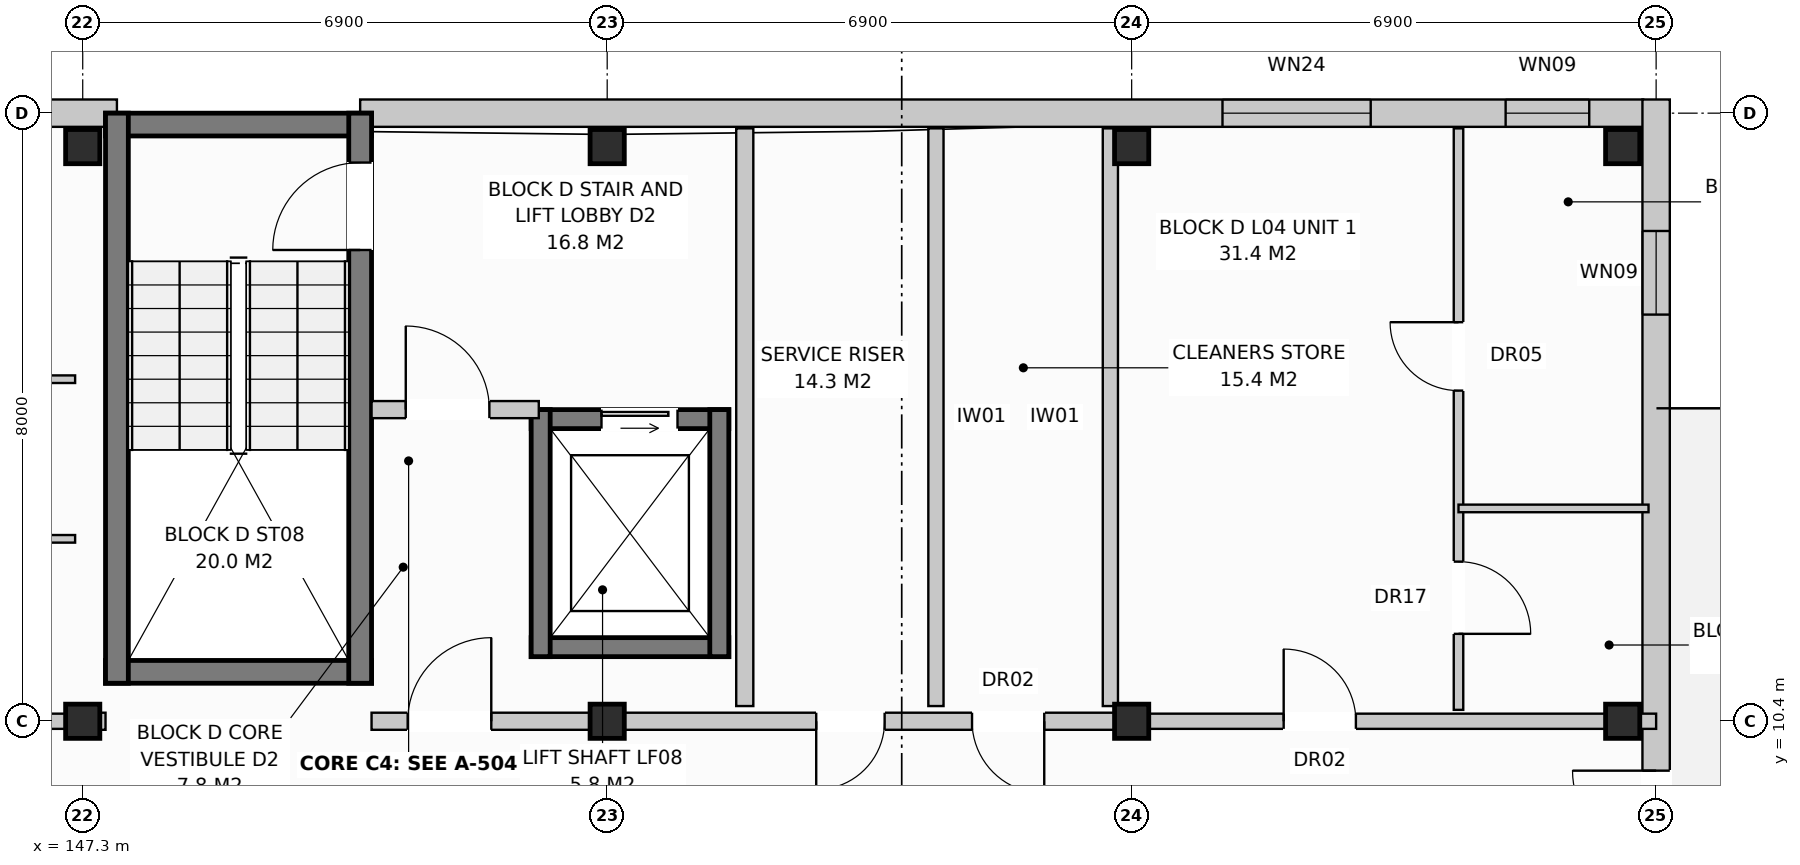
"""IFC4 building model, lengths in metres.
Left out: names, types, materials, properties, quantities, classifications, styles, units other than length and angle.
Written with IfcOpenShell. Run it as: python <this file> out.ifc"""

import sys

from ifc_helpers import new_model, si_unit, direction, frame, frame_2d, origin, origin_with_axes, origin_2d, place, context, subcontext, project, spatial, rectangle, extrude, element, fill, save


model = new_model("IFC4")
c1 = context("Model", 3, precision=1e-05, world=origin(), true_north=direction((0.0, 1.0)))
c2 = subcontext(c1, "Body", "Model", "MODEL_VIEW")
j1 = project(units=[si_unit("LENGTHUNIT", "METRE"), si_unit("PLANEANGLEUNIT", "RADIAN")], contexts=[c1])
p1 = place(None, origin())
s1 = spatial("IfcSite", under=j1, at=p1, CompositionType="ELEMENT")
p2 = place(p1, origin())
s2 = spatial("IfcBuilding", under=s1, at=p2, CompositionType="ELEMENT")
p3 = place(p2, frame((0.0, 0.0, 14.4)))
s3 = spatial("IfcBuildingStorey", under=s2, at=p3, CompositionType="ELEMENT", Elevation=14.4)
for number, where, z_axis, x_axis in (
    (1, (147.3, 10.4, 0.0), (0.0, 0.0, 1.0), (1.0, 0.0, 0.0)),
    (2, (147.3, 17.96, 0.0), (0.0, 0.0, 1.0), (1.0, 0.0, 0.0)),
    (3, (154.2, 10.4, 0.0), (0.0, 0.0, 1.0), (1.0, 0.0, 0.0)),
    (4, (154.2, 17.96, 0.0), (0.0, 0.0, 1.0), (1.0, 0.0, 0.0)),
    (5, (161.1, 10.4, 0.0), (0.0, 0.0, 1.0), (1.0, 0.0, 0.0)),
    (6, (161.1, 17.96, 0.0), (0.0, 0.0, 1.0), (1.0, 0.0, 0.0)),
    (7, (167.56, 10.4, 0.0), (0.0, 0.0, 1.0), (1.0, 0.0, 0.0)),
    (8, (167.56, 17.96, 0.0), (0.0, 0.0, 1.0), (1.0, 0.0, 0.0)),
):
    element("IfcColumn", number, at=place(p3, frame(where, z_axis=z_axis, x_axis=x_axis)), inside=s3, PredefinedType="COLUMN", context=c2, shape_type="SweptSolid", body=[
        extrude(rectangle(XDim=0.45, YDim=0.45, at=origin_2d()), origin(), (0.0, 0.0, 1.0), 3.2),
    ])
p4 = place(p3, frame((130.25, 18.4, 0.0), z_axis=(0.0, 0.0, 1.0), x_axis=(1.0, 0.0, 0.0)))
e9 = element("IfcWall", 9, at=p4, inside=s3, PredefinedType="STANDARD", context=c2, shape_type="SweptSolid", body=[
    extrude(rectangle(XDim=17.5, YDim=0.36, at=frame_2d((8.75, 0.0))), origin(), (0.0, 0.0, 1.0), 2.94),
])
p5 = place(p4, frame((11.97, 0.0, 0.0)))
e10 = element("IfcOpeningElement", 10, at=p5, cuts=e9, PredefinedType="OPENING", context=c2, shape_type="SweptSolid", body=[
    extrude(rectangle(XDim=0.95, YDim=2.1, at=frame_2d((0.475, 1.05))), frame((0.0, 0.192, 0.0), z_axis=(0.0, -1.0, 0.0), x_axis=(1.0, 0.0, 0.0)), (0.0, 0.0, 1.0), 0.384),
])
p6 = place(p4, frame((14.97, 0.0, 0.72)))
e11 = element("IfcOpeningElement", 11, at=p6, cuts=e9, PredefinedType="OPENING", context=c2, shape_type="SweptSolid", body=[
    extrude(rectangle(XDim=1.1, YDim=1.5, at=frame_2d((0.55, 0.75))), frame((0.0, 0.192, 0.0), z_axis=(0.0, -1.0, 0.0), x_axis=(1.0, 0.0, 0.0)), (0.0, 0.0, 1.0), 0.384),
])
p7 = place(p3, frame((150.95, 18.4, 0.0), z_axis=(0.0, 0.0, 1.0), x_axis=(1.0, 0.0, 0.0)))
e12 = element("IfcWall", 12, at=p7, inside=s3, PredefinedType="STANDARD", context=c2, shape_type="SweptSolid", body=[
    extrude(rectangle(XDim=16.88, YDim=0.36, at=frame_2d((8.44, 0.0))), origin(), (0.0, 0.0, 1.0), 2.94),
])
p8 = place(p7, frame((11.345, 0.0, 0.8)))
e13 = element("IfcOpeningElement", 13, at=p8, cuts=e12, PredefinedType="OPENING", context=c2, shape_type="SweptSolid", body=[
    extrude(rectangle(XDim=1.95, YDim=1.65, at=frame_2d((0.975, 0.825))), frame((0.0, 0.192, 0.0), z_axis=(0.0, -1.0, 0.0), x_axis=(1.0, 0.0, 0.0)), (0.0, 0.0, 1.0), 0.384),
])
p9 = place(p7, frame((15.07, 0.0, 0.72)))
e14 = element("IfcOpeningElement", 14, at=p9, cuts=e12, PredefinedType="OPENING", context=c2, shape_type="SweptSolid", body=[
    extrude(rectangle(XDim=1.1, YDim=1.5, at=frame_2d((0.55, 0.75))), frame((0.0, 0.192, 0.0), z_axis=(0.0, -1.0, 0.0), x_axis=(1.0, 0.0, 0.0)), (0.0, 0.0, 1.0), 0.384),
])
p10 = place(p3, frame((168.0, -0.18, 0.0), z_axis=(0.0, 0.0, 1.0), x_axis=(0.0, 1.0, 0.0)))
e15 = element("IfcWall", 15, at=p10, inside=s3, PredefinedType="STANDARD", context=c2, shape_type="SweptSolid", body=[
    extrude(rectangle(XDim=18.76, YDim=0.36, at=frame_2d((9.38, 0.0))), origin(), (0.0, 0.0, 1.0), 2.94),
])
p11 = place(p10, frame((8.83, 0.0, 0.0)))
e16 = element("IfcOpeningElement", 16, at=p11, cuts=e15, PredefinedType="OPENING", context=c2, shape_type="SweptSolid", body=[
    extrude(rectangle(XDim=1.1, YDim=2.1, at=frame_2d((0.55, 1.05))), frame((0.0, 0.192, 0.0), z_axis=(0.0, -1.0, 0.0), x_axis=(1.0, 0.0, 0.0)), (0.0, 0.0, 1.0), 0.384),
])
p12 = place(p10, frame((1.73, 0.0, 0.72)))
e17 = element("IfcOpeningElement", 17, at=p12, cuts=e15, PredefinedType="OPENING", context=c2, shape_type="SweptSolid", body=[
    extrude(rectangle(XDim=1.1, YDim=1.5, at=frame_2d((0.55, 0.75))), frame((0.0, 0.192, 0.0), z_axis=(0.0, -1.0, 0.0), x_axis=(1.0, 0.0, 0.0)), (0.0, 0.0, 1.0), 0.384),
])
p13 = place(p10, frame((15.93, 0.0, 0.72)))
e18 = element("IfcOpeningElement", 18, at=p13, cuts=e15, PredefinedType="OPENING", context=c2, shape_type="SweptSolid", body=[
    extrude(rectangle(XDim=1.1, YDim=1.5, at=frame_2d((0.55, 0.75))), frame((0.0, 0.192, 0.0), z_axis=(0.0, -1.0, 0.0), x_axis=(1.0, 0.0, 0.0)), (0.0, 0.0, 1.0), 0.384),
])
for number, where, z_axis, x_axis in (
    (19, (147.6, 18.25, 0.0), (0.0, 0.0, 1.0), (1.0, 0.0, 0.0)),
    (20, (147.6, 11.05, 0.0), (0.0, 0.0, 1.0), (1.0, 0.0, 0.0)),
):
    element("IfcWall", number, at=place(p3, frame(where, z_axis=z_axis, x_axis=x_axis)), inside=s3, PredefinedType="SHEAR", context=c2, shape_type="SweptSolid", body=[
        extrude(rectangle(XDim=3.5, YDim=0.3, at=frame_2d((1.75, 0.0))), origin(), (0.0, 0.0, 1.0), 2.94),
    ])
p14 = place(p3, frame((147.75, 10.9, 0.0), z_axis=(0.0, 0.0, 1.0), x_axis=(0.0, 1.0, 0.0)))
e21 = element("IfcWall", 21, at=p14, inside=s3, PredefinedType="SHEAR", context=c2, shape_type="SweptSolid", body=[
    extrude(rectangle(XDim=7.5, YDim=0.3, at=frame_2d((3.75, 0.0))), origin(), (0.0, 0.0, 1.0), 2.94),
])
p15 = place(p3, frame((150.95, 10.9, 0.0), z_axis=(0.0, 0.0, 1.0), x_axis=(0.0, 1.0, 0.0)))
e22 = element("IfcWall", 22, at=p15, inside=s3, PredefinedType="SHEAR", context=c2, shape_type="SweptSolid", body=[
    extrude(rectangle(XDim=7.5, YDim=0.3, at=frame_2d((3.75, 0.0))), origin(), (0.0, 0.0, 1.0), 2.94),
])
p16 = place(p15, frame((5.7, 0.0, 0.0)))
e23 = element("IfcOpeningElement", 23, at=p16, cuts=e22, PredefinedType="OPENING", context=c2, shape_type="SweptSolid", body=[
    extrude(rectangle(XDim=1.15, YDim=2.15, at=frame_2d((0.575, 1.075))), frame((0.0, 0.162, 0.0), z_axis=(0.0, -1.0, 0.0), x_axis=(1.0, 0.0, 0.0)), (0.0, 0.0, 1.0), 0.324),
])
p17 = place(p3, frame((153.2, 14.375, 0.0), z_axis=(0.0, 0.0, 1.0), x_axis=(1.0, 0.0, 0.0)))
e24 = element("IfcWall", 24, at=p17, inside=s3, PredefinedType="SHEAR", context=c2, shape_type="SweptSolid", body=[
    extrude(rectangle(XDim=2.6, YDim=0.25, at=frame_2d((1.3, 0.0))), origin(), (0.0, 0.0, 1.0), 2.94),
])
p18 = place(p17, frame((0.925, 0.0, 0.0)))
e25 = element("IfcOpeningElement", 25, at=p18, cuts=e24, PredefinedType="OPENING", context=c2, shape_type="SweptSolid", body=[
    extrude(rectangle(XDim=1.0, YDim=2.1, at=frame_2d((0.5, 1.05))), frame((0.0, 0.137, 0.0), z_axis=(0.0, -1.0, 0.0), x_axis=(1.0, 0.0, 0.0)), (0.0, 0.0, 1.0), 0.274),
])
p19 = place(p3, frame((153.2, 11.375, 0.0), z_axis=(0.0, 0.0, 1.0), x_axis=(1.0, 0.0, 0.0)))
e26 = element("IfcWall", 26, at=p19, inside=s3, PredefinedType="SHEAR", context=c2, shape_type="SweptSolid", body=[
    extrude(rectangle(XDim=2.6, YDim=0.25, at=frame_2d((1.3, 0.0))), origin(), (0.0, 0.0, 1.0), 2.94),
])
for number, where, z_axis, x_axis in (
    (27, (153.325, 11.25, 0.0), (0.0, 0.0, 1.0), (0.0, 1.0, 0.0)),
    (28, (155.675, 11.25, 0.0), (0.0, 0.0, 1.0), (0.0, 1.0, 0.0)),
):
    element("IfcWall", number, at=place(p3, frame(where, z_axis=z_axis, x_axis=x_axis)), inside=s3, PredefinedType="SHEAR", context=c2, shape_type="SweptSolid", body=[
        extrude(rectangle(XDim=3.25, YDim=0.25, at=frame_2d((1.625, 0.0))), origin(), (0.0, 0.0, 1.0), 2.94),
    ])
p20 = place(p3, frame((156.01, 10.6, 0.0), z_axis=(0.0, 0.0, 1.0), x_axis=(0.0, 1.0, 0.0)))
e29 = element("IfcWall", 29, at=p20, inside=s3, PredefinedType="PARTITIONING", context=c2, shape_type="SweptSolid", body=[
    extrude(rectangle(XDim=7.6, YDim=0.225, at=frame_2d((3.8, 0.0))), origin(), (0.0, 0.0, 1.0), 2.59),
])
p21 = place(p3, frame((151.1, 14.5, 0.0), z_axis=(0.0, 0.0, 1.0), x_axis=(1.0, 0.0, 0.0)))
e30 = element("IfcWall", 30, at=p21, inside=s3, PredefinedType="PARTITIONING", context=c2, shape_type="SweptSolid", body=[
    extrude(rectangle(XDim=2.2, YDim=0.225, at=frame_2d((1.1, 0.0))), origin(), (0.0, 0.0, 1.0), 2.94),
])
p22 = place(p21, frame((0.45, 0.0, 0.0)))
e31 = element("IfcOpeningElement", 31, at=p22, cuts=e30, PredefinedType="OPENING", context=c2, shape_type="SweptSolid", body=[
    extrude(rectangle(XDim=1.1, YDim=2.15, at=frame_2d((0.55, 1.075))), frame((0.0, 0.125, 0.0), z_axis=(0.0, -1.0, 0.0), x_axis=(1.0, 0.0, 0.0)), (0.0, 0.0, 1.0), 0.249),
])
p23 = place(p3, frame((147.3, 10.4, 0.0), z_axis=(0.0, 0.0, 1.0), x_axis=(1.0, 0.0, 0.0)))
e32 = element("IfcWall", 32, at=p23, inside=s3, PredefinedType="PARTITIONING", context=c2, shape_type="SweptSolid", body=[
    extrude(rectangle(XDim=0.3, YDim=0.225, at=frame_2d((0.15, 0.0))), origin(), (0.0, 0.0, 1.0), 2.94),
])
p24 = place(p3, frame((158.525, 10.6, 0.0), z_axis=(0.0, 0.0, 1.0), x_axis=(0.0, 1.0, 0.0)))
e33 = element("IfcWall", 33, at=p24, inside=s3, PredefinedType="PARTITIONING", context=c2, shape_type="SweptSolid", body=[
    extrude(rectangle(XDim=7.6, YDim=0.2, at=frame_2d((3.8, 0.0))), origin(), (0.0, 0.0, 1.0), 2.94),
])
p25 = place(p3, frame((160.82, 10.6, 0.0), z_axis=(0.0, 0.0, 1.0), x_axis=(0.0, 1.0, 0.0)))
e34 = element("IfcWall", 34, at=p25, inside=s3, PredefinedType="PARTITIONING", context=c2, shape_type="SweptSolid", body=[
    extrude(rectangle(XDim=7.6, YDim=0.2, at=frame_2d((3.8, 0.0))), origin(), (0.0, 0.0, 1.0), 2.38),
])
p26 = place(p3, frame((151.1, 10.4, 0.0), z_axis=(0.0, 0.0, 1.0), x_axis=(1.0, 0.0, 0.0)))
e35 = element("IfcWall", 35, at=p26, inside=s3, PredefinedType="PARTITIONING", context=c2, shape_type="SweptSolid", body=[
    extrude(rectangle(XDim=10.0, YDim=0.225, at=frame_2d((5.0, 0.0))), origin(), (0.0, 0.0, 1.0), 2.38),
])
p27 = place(p26, frame((0.475, 0.0, 0.0)))
e36 = element("IfcOpeningElement", 36, at=p27, cuts=e35, PredefinedType="OPENING", context=c2, shape_type="SweptSolid", body=[
    extrude(rectangle(XDim=1.1, YDim=2.15, at=frame_2d((0.55, 1.075))), frame((0.0, 0.125, 0.0), z_axis=(0.0, -1.0, 0.0), x_axis=(1.0, 0.0, 0.0)), (0.0, 0.0, 1.0), 0.249),
])
p28 = place(p26, frame((5.85, 0.0, 0.0)))
e37 = element("IfcOpeningElement", 37, at=p28, cuts=e35, PredefinedType="OPENING", context=c2, shape_type="SweptSolid", body=[
    extrude(rectangle(XDim=0.9, YDim=2.1, at=frame_2d((0.45, 1.05))), frame((0.0, 0.125, 0.0), z_axis=(0.0, -1.0, 0.0), x_axis=(1.0, 0.0, 0.0)), (0.0, 0.0, 1.0), 0.249),
])
p29 = place(p26, frame((7.9, 0.0, 0.0)))
e38 = element("IfcOpeningElement", 38, at=p29, cuts=e35, PredefinedType="OPENING", context=c2, shape_type="SweptSolid", body=[
    extrude(rectangle(XDim=0.95, YDim=2.15, at=frame_2d((0.475, 1.075))), frame((0.0, 0.125, 0.0), z_axis=(0.0, -1.0, 0.0), x_axis=(1.0, 0.0, 0.0)), (0.0, 0.0, 1.0), 0.249),
])
p30 = place(p3, frame((140.4, 10.4, 0.0), z_axis=(0.0, 0.0, 1.0), x_axis=(1.0, 0.0, 0.0)))
e39 = element("IfcWall", 39, at=p30, inside=s3, PredefinedType="PARTITIONING", context=c2, shape_type="SweptSolid", body=[
    extrude(rectangle(XDim=6.9, YDim=0.2, at=frame_2d((3.45, 0.0))), origin(), (0.0, 0.0, 1.0), 2.38),
])
p31 = place(p30, frame((2.0, 0.0, 0.0)))
e40 = element("IfcOpeningElement", 40, at=p31, cuts=e39, PredefinedType="OPENING", context=c2, shape_type="SweptSolid", body=[
    extrude(rectangle(XDim=0.95, YDim=2.15, at=frame_2d((0.475, 1.075))), frame((0.0, 0.112, 0.0), z_axis=(0.0, -1.0, 0.0), x_axis=(1.0, 0.0, 0.0)), (0.0, 0.0, 1.0), 0.224),
])
for number, where, z_axis, x_axis in (
    (41, (144.3, 12.8, 0.0), (0.0, 0.0, 1.0), (1.0, 0.0, 0.0)),
    (42, (144.3, 14.9, 0.0), (0.0, 0.0, 1.0), (1.0, 0.0, 0.0)),
):
    element("IfcWall", number, at=place(p3, frame(where, z_axis=z_axis, x_axis=x_axis)), inside=s3, PredefinedType="PARTITIONING", context=c2, shape_type="SweptSolid", body=[
        extrude(rectangle(XDim=2.9, YDim=0.1, at=frame_2d((1.45, 0.0))), origin(), (0.0, 0.0, 1.0), 2.94),
    ])
p32 = place(p3, frame((161.1, 10.4, 0.0), z_axis=(0.0, 0.0, 1.0), x_axis=(1.0, 0.0, 0.0)))
e43 = element("IfcWall", 43, at=p32, inside=s3, PredefinedType="PARTITIONING", context=c2, shape_type="SweptSolid", body=[
    extrude(rectangle(XDim=6.9, YDim=0.2, at=frame_2d((3.45, 0.0))), origin(), (0.0, 0.0, 1.0), 2.38),
])
p33 = place(p32, frame((2.0, 0.0, 0.0)))
e44 = element("IfcOpeningElement", 44, at=p33, cuts=e43, PredefinedType="OPENING", context=c2, shape_type="SweptSolid", body=[
    extrude(rectangle(XDim=0.95, YDim=2.15, at=frame_2d((0.475, 1.075))), frame((0.0, 0.112, 0.0), z_axis=(0.0, -1.0, 0.0), x_axis=(1.0, 0.0, 0.0)), (0.0, 0.0, 1.0), 0.224),
])
p34 = place(p3, frame((165.4, 10.55, 0.0), z_axis=(0.0, 0.0, 1.0), x_axis=(0.0, 1.0, 0.0)))
e45 = element("IfcWall", 45, at=p34, inside=s3, PredefinedType="PARTITIONING", context=c2, shape_type="SweptSolid", body=[
    extrude(rectangle(XDim=7.65, YDim=0.125, at=frame_2d((3.825, 0.0))), origin(), (0.0, 0.0, 1.0), 2.94),
])
p35 = place(p34, frame((1.0, 0.0, 0.0)))
e46 = element("IfcOpeningElement", 46, at=p35, cuts=e45, PredefinedType="OPENING", context=c2, shape_type="SweptSolid", body=[
    extrude(rectangle(XDim=0.95, YDim=2.1, at=frame_2d((0.475, 1.05))), frame((0.0, 0.074, 0.0), z_axis=(0.0, -1.0, 0.0), x_axis=(1.0, 0.0, 0.0)), (0.0, 0.0, 1.0), 0.149),
])
p36 = place(p34, frame((4.2, 0.0, 0.0)))
e47 = element("IfcOpeningElement", 47, at=p36, cuts=e45, PredefinedType="OPENING", context=c2, shape_type="SweptSolid", body=[
    extrude(rectangle(XDim=0.9, YDim=2.1, at=frame_2d((0.45, 1.05))), frame((0.0, 0.074, 0.0), z_axis=(0.0, -1.0, 0.0), x_axis=(1.0, 0.0, 0.0)), (0.0, 0.0, 1.0), 0.149),
])
p37 = place(p3, frame((165.4, 13.2, 0.0), z_axis=(0.0, 0.0, 1.0), x_axis=(1.0, 0.0, 0.0)))
e48 = element("IfcWall", 48, at=p37, inside=s3, PredefinedType="PARTITIONING", context=c2, shape_type="SweptSolid", body=[
    extrude(rectangle(XDim=2.5, YDim=0.1, at=frame_2d((1.25, 0.0))), origin(), (0.0, 0.0, 1.0), 2.94),
])
p38 = place(p8, origin_with_axes())
e49 = element("IfcWindow", 49, at=p38, inside=s3, PartitioningType="SINGLE_PANEL", PredefinedType="WINDOW", context=c2, shape_type="SweptSolid", body=[
    extrude(rectangle(XDim=1.95, YDim=1.65, at=frame_2d((0.975, 0.825))), frame((0.0, 0.03, 0.0), z_axis=(0.0, -1.0, 0.0), x_axis=(1.0, 0.0, 0.0)), (0.0, 0.0, 1.0), 0.06),
])
fill(e13, e49)
p39 = place(p9, origin_with_axes())
e50 = element("IfcWindow", 50, at=p39, inside=s3, PartitioningType="SINGLE_PANEL", PredefinedType="WINDOW", context=c2, shape_type="SweptSolid", body=[
    extrude(rectangle(XDim=1.1, YDim=1.5, at=frame_2d((0.55, 0.75))), frame((0.0, 0.03, 0.0), z_axis=(0.0, -1.0, 0.0), x_axis=(1.0, 0.0, 0.0)), (0.0, 0.0, 1.0), 0.06),
])
fill(e14, e50)
p40 = place(p11, origin_with_axes())
e51 = element("IfcDoor", 51, at=p40, inside=s3, OperationType="SINGLE_SWING_RIGHT", PredefinedType="DOOR", context=c2, shape_type="SweptSolid", body=[
    extrude(rectangle(XDim=1.1, YDim=2.1, at=frame_2d((0.55, 1.05))), frame((0.0, 0.025, 0.0), z_axis=(0.0, -1.0, 0.0), x_axis=(1.0, 0.0, 0.0)), (0.0, 0.0, 1.0), 0.05),
])
fill(e16, e51)
p41 = place(p13, origin_with_axes())
e52 = element("IfcWindow", 52, at=p41, inside=s3, PartitioningType="SINGLE_PANEL", PredefinedType="WINDOW", context=c2, shape_type="SweptSolid", body=[
    extrude(rectangle(XDim=1.1, YDim=1.5, at=frame_2d((0.55, 0.75))), frame((0.0, 0.03, 0.0), z_axis=(0.0, -1.0, 0.0), x_axis=(1.0, 0.0, 0.0)), (0.0, 0.0, 1.0), 0.06),
])
fill(e18, e52)
p42 = place(p16, origin_with_axes())
e53 = element("IfcDoor", 53, at=p42, inside=s3, OperationType="SINGLE_SWING_LEFT", PredefinedType="DOOR", context=c2, shape_type="SweptSolid", body=[
    extrude(rectangle(XDim=1.15, YDim=2.15, at=frame_2d((0.575, 1.075))), frame((0.0, 0.025, 0.0), z_axis=(0.0, -1.0, 0.0), x_axis=(1.0, 0.0, 0.0)), (0.0, 0.0, 1.0), 0.05),
])
fill(e23, e53)
p43 = place(p18, origin_with_axes())
e54 = element("IfcDoor", 54, at=p43, inside=s3, OperationType="SLIDING_TO_LEFT", PredefinedType="DOOR", context=c2, shape_type="SweptSolid", body=[
    extrude(rectangle(XDim=1.0, YDim=2.1, at=frame_2d((0.5, 1.05))), frame((0.0, 0.025, 0.0), z_axis=(0.0, -1.0, 0.0), x_axis=(1.0, 0.0, 0.0)), (0.0, 0.0, 1.0), 0.05),
])
fill(e25, e54)
p44 = place(p22, origin_with_axes())
e55 = element("IfcDoor", 55, at=p44, inside=s3, OperationType="SINGLE_SWING_LEFT", PredefinedType="DOOR", context=c2, shape_type="SweptSolid", body=[
    extrude(rectangle(XDim=1.1, YDim=2.15, at=frame_2d((0.55, 1.075))), frame((0.0, 0.025, 0.0), z_axis=(0.0, -1.0, 0.0), x_axis=(1.0, 0.0, 0.0)), (0.0, 0.0, 1.0), 0.05),
])
fill(e31, e55)
p45 = place(p27, origin_with_axes())
e56 = element("IfcDoor", 56, at=p45, inside=s3, OperationType="SINGLE_SWING_RIGHT", PredefinedType="DOOR", context=c2, shape_type="SweptSolid", body=[
    extrude(rectangle(XDim=1.1, YDim=2.15, at=frame_2d((0.55, 1.075))), frame((0.0, 0.025, 0.0), z_axis=(0.0, -1.0, 0.0), x_axis=(1.0, 0.0, 0.0)), (0.0, 0.0, 1.0), 0.05),
])
fill(e36, e56)
p46 = place(p28, frame((0.9, 0.0, 0.0), z_axis=(0.0, 0.0, 1.0), x_axis=(-1.0, 0.0, 0.0)))
e57 = element("IfcDoor", 57, at=p46, inside=s3, OperationType="SINGLE_SWING_LEFT", PredefinedType="DOOR", context=c2, shape_type="SweptSolid", body=[
    extrude(rectangle(XDim=0.9, YDim=2.1, at=frame_2d((0.45, 1.05))), frame((0.0, 0.025, 0.0), z_axis=(0.0, -1.0, 0.0), x_axis=(1.0, 0.0, 0.0)), (0.0, 0.0, 1.0), 0.05),
])
fill(e37, e57)
p47 = place(p29, frame((0.95, 0.0, 0.0), z_axis=(0.0, 0.0, 1.0), x_axis=(-1.0, 0.0, 0.0)))
e58 = element("IfcDoor", 58, at=p47, inside=s3, OperationType="SINGLE_SWING_RIGHT", PredefinedType="DOOR", context=c2, shape_type="SweptSolid", body=[
    extrude(rectangle(XDim=0.95, YDim=2.15, at=frame_2d((0.475, 1.075))), frame((0.0, 0.025, 0.0), z_axis=(0.0, -1.0, 0.0), x_axis=(1.0, 0.0, 0.0)), (0.0, 0.0, 1.0), 0.05),
])
fill(e38, e58)
p48 = place(p33, origin_with_axes())
e59 = element("IfcDoor", 59, at=p48, inside=s3, OperationType="SINGLE_SWING_LEFT", PredefinedType="DOOR", context=c2, shape_type="SweptSolid", body=[
    extrude(rectangle(XDim=0.95, YDim=2.15, at=frame_2d((0.475, 1.075))), frame((0.0, 0.025, 0.0), z_axis=(0.0, -1.0, 0.0), x_axis=(1.0, 0.0, 0.0)), (0.0, 0.0, 1.0), 0.05),
])
fill(e44, e59)
p49 = place(p35, frame((0.95, 0.0, 0.0), z_axis=(0.0, 0.0, 1.0), x_axis=(-1.0, 0.0, 0.0)))
e60 = element("IfcDoor", 60, at=p49, inside=s3, OperationType="SINGLE_SWING_LEFT", PredefinedType="DOOR", context=c2, shape_type="SweptSolid", body=[
    extrude(rectangle(XDim=0.95, YDim=2.1, at=frame_2d((0.475, 1.05))), frame((0.0, 0.025, 0.0), z_axis=(0.0, -1.0, 0.0), x_axis=(1.0, 0.0, 0.0)), (0.0, 0.0, 1.0), 0.05),
])
fill(e46, e60)
p50 = place(p36, origin_with_axes())
e61 = element("IfcDoor", 61, at=p50, inside=s3, OperationType="SINGLE_SWING_RIGHT", PredefinedType="DOOR", context=c2, shape_type="SweptSolid", body=[
    extrude(rectangle(XDim=0.9, YDim=2.1, at=frame_2d((0.45, 1.05))), frame((0.0, 0.025, 0.0), z_axis=(0.0, -1.0, 0.0), x_axis=(1.0, 0.0, 0.0)), (0.0, 0.0, 1.0), 0.05),
])
fill(e47, e61)
save(model, sys.argv[1])
